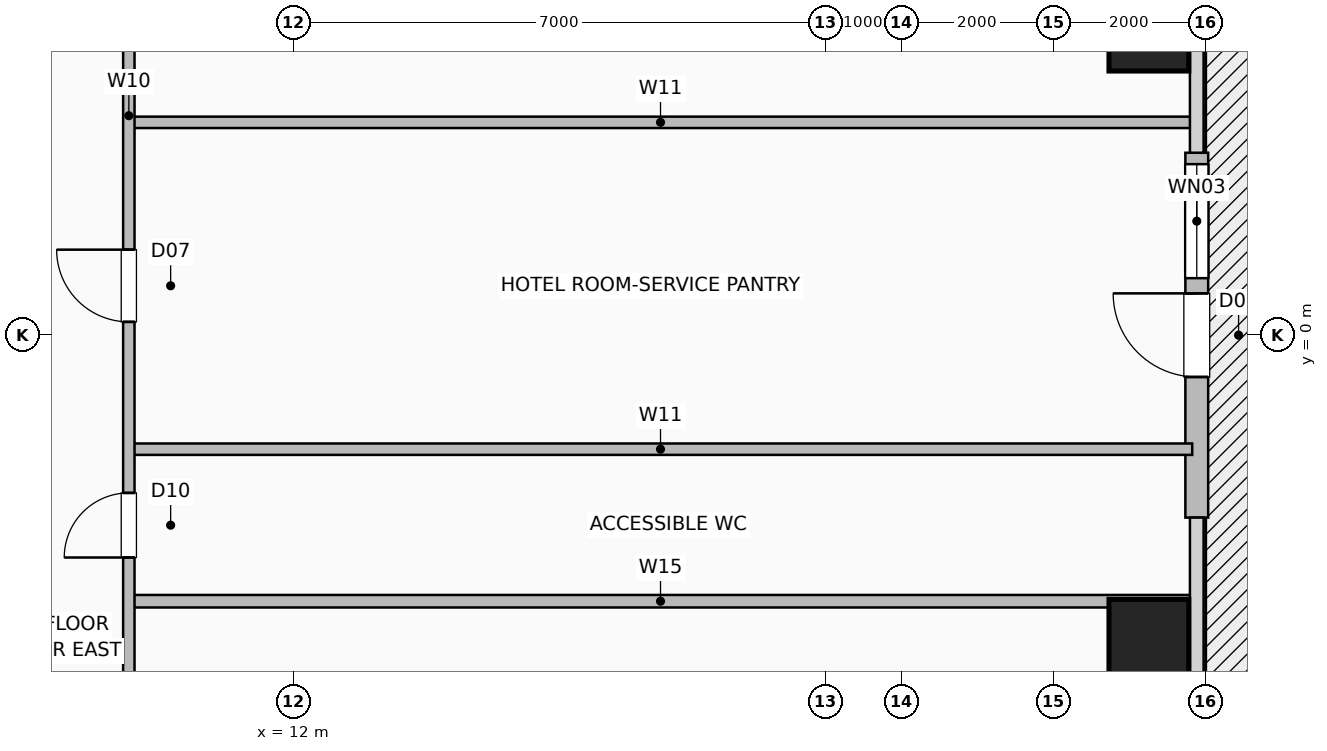
"""IFC4 building model, lengths in metres.
Left out: names, types, materials, properties, quantities, classifications, styles, units other than length and angle.
Written with IfcOpenShell. Run it as: python <this file> out.ifc"""

import sys

from ifc_helpers import new_model, si_unit, direction, frame, frame_2d, origin, origin_2d, place, context, subcontext, project, spatial, rectangle, hollow_rectangle, extrude, element, fill, save


model = new_model("IFC4")
c1 = context("Model", 3, precision=1e-05, world=origin(), true_north=direction((0.0, 1.0)))
c2 = subcontext(c1, "Body", "Model", "MODEL_VIEW")
j1 = project(units=[si_unit("LENGTHUNIT", "METRE"), si_unit("PLANEANGLEUNIT", "RADIAN")], contexts=[c1])
p1 = place(None, origin())
s1 = spatial("IfcSite", under=j1, at=p1, CompositionType="ELEMENT")
p2 = place(p1, origin())
s2 = spatial("IfcBuilding", under=s1, at=p2, CompositionType="ELEMENT")
p3 = place(p2, frame((0.0, 0.0, 27.0)))
s3 = spatial("IfcBuildingStorey", under=s2, at=p3, CompositionType="ELEMENT", Elevation=27.0)
for number, where, z_axis, x_axis in (
    (1, (23.25, -4.0, 0.0), (0.0, 0.0, 1.0), (1.0, 0.0, 0.0)),
    (2, (23.25, 4.0, 0.0), (0.0, 0.0, 1.0), (1.0, 0.0, 0.0)),
):
    element("IfcColumn", number, at=place(p3, frame(where, z_axis=z_axis, x_axis=x_axis)), inside=s3, PredefinedType="COLUMN", context=c2, shape_type="SweptSolid", body=[
        extrude(hollow_rectangle(XDim=1.05, YDim=1.05, WallThickness=0.05, at=origin_2d()), origin(), (0.0, 0.0, 1.0), 3.5),
    ])
p4 = place(p3, frame((23.88, -2.4, 0.0), z_axis=(0.0, 0.0, 1.0), x_axis=(0.0, 1.0, 0.0)))
e3 = element("IfcWall", 3, at=p4, inside=s3, PredefinedType="SOLIDWALL", context=c2, shape_type="SweptSolid", body=[
    extrude(rectangle(XDim=4.8, YDim=0.3, at=frame_2d((2.4, 0.0))), origin(), (0.0, 0.0, 1.0), 3.25),
])
p5 = place(p4, frame((1.85, 0.0, 0.0)))
e4 = element("IfcOpeningElement", 4, at=p5, cuts=e3, PredefinedType="OPENING", context=c2, shape_type="SweptSolid", body=[
    extrude(rectangle(XDim=1.1, YDim=2.2, at=frame_2d((0.55, 1.1))), frame((0.0, 0.16, 0.0), z_axis=(0.0, -1.0, 0.0), x_axis=(1.0, 0.0, 0.0)), (0.0, 0.0, 1.0), 0.32),
])
p6 = place(p4, frame((3.15, 0.0, 0.85)))
e5 = element("IfcOpeningElement", 5, at=p6, cuts=e3, PredefinedType="OPENING", context=c2, shape_type="SweptSolid", body=[
    extrude(rectangle(XDim=1.5, YDim=1.8, at=frame_2d((0.75, 0.9))), frame((0.0, 0.16, 0.0), z_axis=(0.0, -1.0, 0.0), x_axis=(1.0, 0.0, 0.0)), (0.0, 0.0, 1.0), 0.32),
])
p7 = place(p3, frame((9.83, -3.5, 0.0), z_axis=(0.0, 0.0, 1.0), x_axis=(1.0, 0.0, 0.0)))
e6 = element("IfcWall", 6, at=p7, inside=s3, PredefinedType="PLUMBINGWALL", context=c2, shape_type="SweptSolid", body=[
    extrude(rectangle(XDim=13.99, YDim=0.165, at=frame_2d((6.995, 0.0))), origin(), (0.0, 0.0, 1.0), 3.25),
])
for number, where, z_axis, x_axis in (
    (7, (9.83, -1.5, 0.0), (0.0, 0.0, 1.0), (1.0, 0.0, 0.0)),
    (8, (9.83, 2.8, 0.0), (0.0, 0.0, 1.0), (1.0, 0.0, 0.0)),
):
    element("IfcWall", number, at=place(p3, frame(where, z_axis=z_axis, x_axis=x_axis)), inside=s3, PredefinedType="PARTITIONING", context=c2, shape_type="SweptSolid", body=[
        extrude(rectangle(XDim=13.99, YDim=0.15, at=frame_2d((6.995, 0.0))), origin(), (0.0, 0.0, 1.0), 3.25),
    ])
p8 = place(p3, frame((9.83, -7.57, 0.0), z_axis=(0.0, 0.0, 1.0), x_axis=(0.0, 1.0, 0.0)))
e9 = element("IfcWall", 9, at=p8, inside=s3, PredefinedType="PARTITIONING", context=c2, shape_type="SweptSolid", body=[
    extrude(rectangle(XDim=15.14, YDim=0.15, at=frame_2d((7.57, 0.0))), origin(), (0.0, 0.0, 1.0), 3.25),
])
p9 = place(p8, frame((1.62, 0.0, 0.0)))
e10 = element("IfcOpeningElement", 10, at=p9, cuts=e9, PredefinedType="OPENING", context=c2, shape_type="SweptSolid", body=[
    extrude(rectangle(XDim=0.95, YDim=2.06, at=frame_2d((0.475, 1.03))), frame((0.0, 0.085, 0.0), z_axis=(0.0, -1.0, 0.0), x_axis=(1.0, 0.0, 0.0)), (0.0, 0.0, 1.0), 0.17),
])
p10 = place(p8, frame((4.645, 0.0, 0.0)))
e11 = element("IfcOpeningElement", 11, at=p10, cuts=e9, PredefinedType="OPENING", context=c2, shape_type="SweptSolid", body=[
    extrude(rectangle(XDim=0.85, YDim=2.05, at=frame_2d((0.425, 1.025))), frame((0.0, 0.085, 0.0), z_axis=(0.0, -1.0, 0.0), x_axis=(1.0, 0.0, 0.0)), (0.0, 0.0, 1.0), 0.17),
])
p11 = place(p8, frame((7.745, 0.0, 0.0)))
e12 = element("IfcOpeningElement", 12, at=p11, cuts=e9, PredefinedType="OPENING", context=c2, shape_type="SweptSolid", body=[
    extrude(rectangle(XDim=0.95, YDim=2.06, at=frame_2d((0.475, 1.03))), frame((0.0, 0.085, 0.0), z_axis=(0.0, -1.0, 0.0), x_axis=(1.0, 0.0, 0.0)), (0.0, 0.0, 1.0), 0.17),
])
p12 = place(p8, frame((12.22, 0.0, 0.0)))
e13 = element("IfcOpeningElement", 13, at=p12, cuts=e9, PredefinedType="OPENING", context=c2, shape_type="SweptSolid", body=[
    extrude(rectangle(XDim=0.95, YDim=2.06, at=frame_2d((0.475, 1.03))), frame((0.0, 0.085, 0.0), z_axis=(0.0, -1.0, 0.0), x_axis=(1.0, 0.0, 0.0)), (0.0, 0.0, 1.0), 0.17),
])
p13 = place(p5, origin())
e14 = element("IfcDoor", 14, at=p13, inside=s3, OperationType="SINGLE_SWING_RIGHT", PredefinedType="DOOR", context=c2, shape_type="SweptSolid", body=[
    extrude(rectangle(XDim=1.1, YDim=2.2, at=frame_2d((0.55, 1.1))), frame((0.0, 0.025, 0.0), z_axis=(0.0, -1.0, 0.0), x_axis=(1.0, 0.0, 0.0)), (0.0, 0.0, 1.0), 0.05),
])
fill(e4, e14)
p14 = place(p6, origin())
e15 = element("IfcWindow", 15, at=p14, inside=s3, PartitioningType="SINGLE_PANEL", PredefinedType="WINDOW", context=c2, shape_type="SweptSolid", body=[
    extrude(rectangle(XDim=1.5, YDim=1.8, at=frame_2d((0.75, 0.9))), frame((0.0, 0.03, 0.0), z_axis=(0.0, -1.0, 0.0), x_axis=(1.0, 0.0, 0.0)), (0.0, 0.0, 1.0), 0.06),
])
fill(e5, e15)
p15 = place(p10, origin())
e16 = element("IfcDoor", 16, at=p15, inside=s3, OperationType="SINGLE_SWING_LEFT", PredefinedType="DOOR", context=c2, shape_type="SweptSolid", body=[
    extrude(rectangle(XDim=0.85, YDim=2.05, at=frame_2d((0.425, 1.025))), frame((0.0, 0.025, 0.0), z_axis=(0.0, -1.0, 0.0), x_axis=(1.0, 0.0, 0.0)), (0.0, 0.0, 1.0), 0.05),
])
fill(e11, e16)
p16 = place(p11, origin())
e17 = element("IfcDoor", 17, at=p16, inside=s3, OperationType="SINGLE_SWING_RIGHT", PredefinedType="DOOR", context=c2, shape_type="SweptSolid", body=[
    extrude(rectangle(XDim=0.95, YDim=2.06, at=frame_2d((0.475, 1.03))), frame((0.0, 0.025, 0.0), z_axis=(0.0, -1.0, 0.0), x_axis=(1.0, 0.0, 0.0)), (0.0, 0.0, 1.0), 0.05),
])
fill(e12, e17)
save(model, sys.argv[1])
